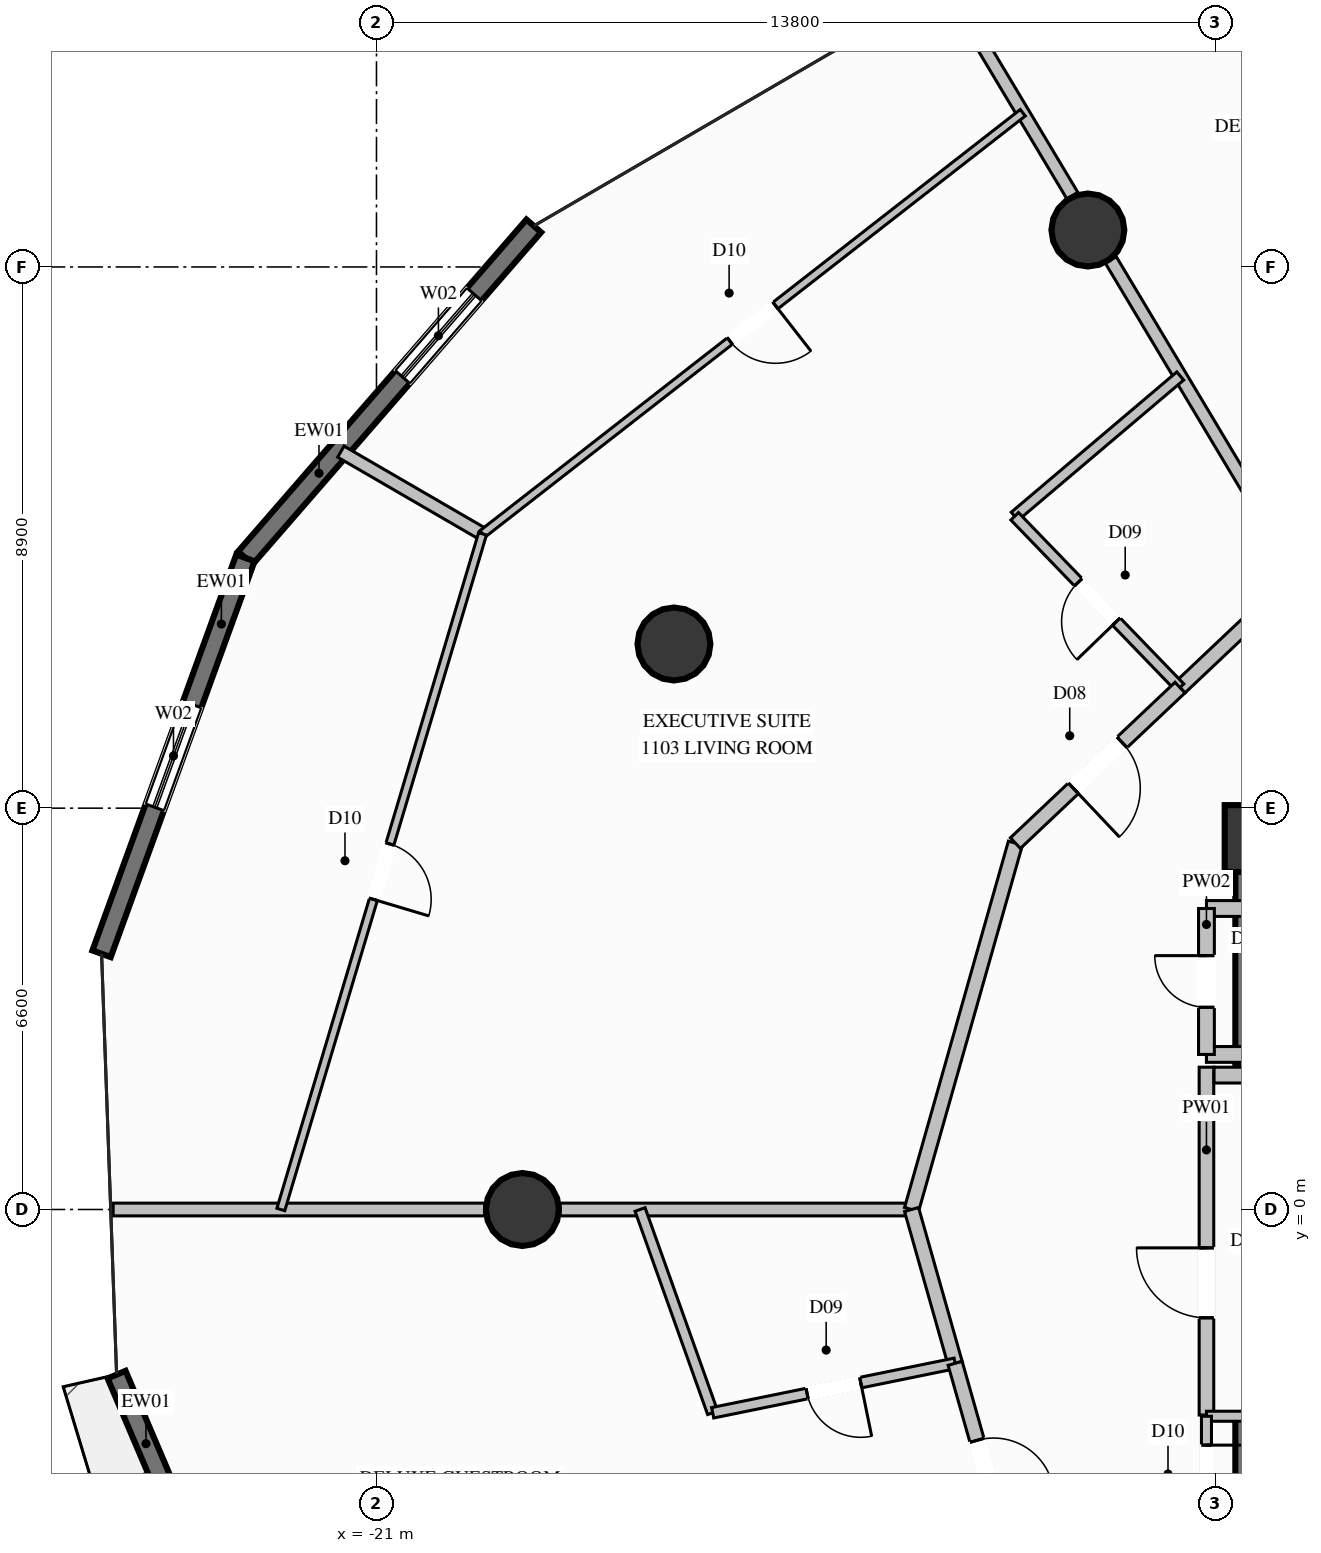
"""IFC4 building model, lengths in metres.
Left out: names, types, materials, properties, quantities, classifications, styles, units other than length and angle.
Written with IfcOpenShell. Run it as: python <this file> out.ifc"""

import sys

from ifc_helpers import new_model, si_unit, direction, frame, frame_2d, origin, origin_2d, place, context, subcontext, project, spatial, rectangle, circle, extrude, element, fill, save


model = new_model("IFC4")
c1 = context("Model", 3, precision=1e-05, world=origin(), true_north=direction((0.0, 1.0)))
c2 = subcontext(c1, "Body", "Model", "MODEL_VIEW")
j1 = project(units=[si_unit("LENGTHUNIT", "METRE"), si_unit("PLANEANGLEUNIT", "RADIAN")], contexts=[c1])
p1 = place(None, origin())
s1 = spatial("IfcSite", under=j1, at=p1, CompositionType="ELEMENT")
p2 = place(p1, origin())
s2 = spatial("IfcBuilding", under=s1, at=p2, CompositionType="ELEMENT")
p3 = place(p2, frame((0.0, 0.0, 42.8)))
s3 = spatial("IfcBuildingStorey", under=s2, at=p3, CompositionType="ELEMENT", Elevation=42.8)
p4 = place(p3, frame((-6.5, 6.1, 0.0), z_axis=(0.0, 0.0, 1.0), x_axis=(1.0, 0.0, 0.0)))
e1 = element("IfcColumn", 1, at=p4, inside=s3, PredefinedType="COLUMN", context=c2, shape_type="SweptSolid", body=[
    extrude(rectangle(XDim=1.1, YDim=1.1, at=origin_2d()), origin(), (0.0, 0.0, 1.0), 3.6),
])
p5 = place(p3, frame((-6.5, 2.35, 0.0), z_axis=(0.0, 0.0, 1.0), x_axis=(0.0, 1.0, 0.0)))
e2 = element("IfcWall", 2, at=p5, inside=s3, PredefinedType="SHEAR", context=c2, shape_type="SweptSolid", body=[
    extrude(rectangle(XDim=4.125, YDim=0.75, at=frame_2d((2.062, 0.0))), origin(), (0.0, 0.0, 1.0), 3.6),
])
p6 = place(p3, frame((-6.5, -6.475, 0.0), z_axis=(0.0, 0.0, 1.0), x_axis=(0.0, 1.0, 0.0)))
e3 = element("IfcWall", 3, at=p6, inside=s3, PredefinedType="SHEAR", context=c2, shape_type="SweptSolid", body=[
    extrude(rectangle(XDim=3.125, YDim=0.75, at=frame_2d((1.562, 0.0))), origin(), (0.0, 0.0, 1.0), 3.6),
])
for number, where, z_axis, x_axis in (
    (4, (-9.3, 16.108, 0.0), (0.0, 0.0, 1.0), (1.0, 0.0, 0.0)),
    (5, (-16.108, 9.3, 0.0), (0.0, 0.0, 1.0), (1.0, 0.0, 0.0)),
    (6, (-18.6, 0.0, 0.0), (0.0, 0.0, 1.0), (1.0, 0.0, 0.0)),
):
    element("IfcColumn", number, at=place(p3, frame(where, z_axis=z_axis, x_axis=x_axis)), inside=s3, PredefinedType="COLUMN", context=c2, shape_type="SweptSolid", body=[
        extrude(circle(Radius=0.6, at=origin_2d()), origin(), (0.0, 0.0, 1.0), 3.6),
    ])
p7 = place(p3, frame((-23.156, 10.715, 0.0), z_axis=(0.0, 0.0, 1.0), x_axis=(0.655795022555, 0.75493899647, 0.0)))
e7 = element("IfcWall", 7, at=p7, inside=s3, PredefinedType="SOLIDWALL", context=c2, shape_type="SweptSolid", body=[
    extrude(rectangle(XDim=7.232, YDim=0.32, at=frame_2d((3.616, 0.0))), origin(), (0.0, 0.0, 1.0), 3.34),
])
p8 = place(p7, frame((3.941, 0.0, 0.35)))
e8 = element("IfcOpeningElement", 8, at=p8, cuts=e7, PredefinedType="OPENING", context=c2, shape_type="SweptSolid", body=[
    extrude(rectangle(XDim=1.8, YDim=2.6, at=frame_2d((0.9, 1.3))), frame((0.0, 0.17, 0.0), z_axis=(0.0, -1.0, 0.0), x_axis=(1.0, 0.0, 0.0)), (0.0, 0.0, 1.0), 0.34),
])
p9 = place(p3, frame((-25.521, 4.205, 0.0), z_axis=(0.0, 0.0, 1.0), x_axis=(0.341451539559, 0.939899380856, 0.0)))
e9 = element("IfcWall", 9, at=p9, inside=s3, PredefinedType="SOLIDWALL", context=c2, shape_type="SweptSolid", body=[
    extrude(rectangle(XDim=6.926, YDim=0.32, at=frame_2d((3.463, 0.0))), origin(), (0.0, 0.0, 1.0), 3.34),
])
p10 = place(p9, frame((2.563, 0.0, 0.35)))
e10 = element("IfcOpeningElement", 10, at=p10, cuts=e9, PredefinedType="OPENING", context=c2, shape_type="SweptSolid", body=[
    extrude(rectangle(XDim=1.8, YDim=2.6, at=frame_2d((0.9, 1.3))), frame((0.0, 0.17, 0.0), z_axis=(0.0, -1.0, 0.0), x_axis=(1.0, 0.0, 0.0)), (0.0, 0.0, 1.0), 0.34),
])
p11 = place(p3, frame((-22.441, -9.371, 0.0), z_axis=(0.0, 0.0, 1.0), x_axis=(-0.391681637704, 0.920100806806, 0.0)))
e11 = element("IfcWall", 11, at=p11, inside=s3, PredefinedType="SOLIDWALL", context=c2, shape_type="SweptSolid", body=[
    extrude(rectangle(XDim=7.233, YDim=0.32, at=frame_2d((3.616, 0.0))), origin(), (0.0, 0.0, 1.0), 3.34),
])
p12 = place(p11, frame((2.716, 0.0, 0.35)))
e12 = element("IfcOpeningElement", 12, at=p12, cuts=e11, PredefinedType="OPENING", context=c2, shape_type="SweptSolid", body=[
    extrude(rectangle(XDim=1.8, YDim=2.6, at=frame_2d((0.9, 1.3))), frame((0.0, 0.17, 0.0), z_axis=(0.0, -1.0, 0.0), x_axis=(1.0, 0.0, 0.0)), (0.0, 0.0, 1.0), 0.34),
])
p13 = place(p3, frame((-7.35, -3.38, 0.0), z_axis=(0.0, 0.0, 1.0), x_axis=(0.0, 1.0, 0.0)))
e13 = element("IfcWall", 13, at=p13, inside=s3, PredefinedType="PARTITIONING", context=c2, shape_type="SweptSolid", body=[
    extrude(rectangle(XDim=5.72, YDim=0.24, at=frame_2d((2.86, 0.0))), origin(), (0.0, 0.0, 1.0), 2.425),
])
p14 = place(p13, frame((1.599, 0.0, 0.0)))
e14 = element("IfcOpeningElement", 14, at=p14, cuts=e13, PredefinedType="OPENING", context=c2, shape_type="SweptSolid", body=[
    extrude(rectangle(XDim=1.15, YDim=2.2, at=frame_2d((0.575, 1.1))), frame((0.0, 0.13, 0.0), z_axis=(0.0, -1.0, 0.0), x_axis=(1.0, 0.0, 0.0)), (0.0, 0.0, 1.0), 0.26),
])
p15 = place(p3, frame((-7.225, 2.21, 0.0), z_axis=(0.0, 0.0, 1.0), x_axis=(1.0, 0.0, 0.0)))
e15 = element("IfcWall", 15, at=p15, inside=s3, PredefinedType="PARTITIONING", context=c2, shape_type="SweptSolid", body=[
    extrude(rectangle(XDim=0.875, YDim=0.26, at=frame_2d((0.438, 0.0))), origin(), (0.0, 0.0, 1.0), 3.34),
])
for number, where, z_axis, x_axis in (
    (16, (-7.35, 4.95, 0.0), (0.0, 0.0, 1.0), (1.0, 0.0, 0.0)),
    (17, (-7.35, 2.55, 0.0), (0.0, 0.0, 1.0), (1.0, 0.0, 0.0)),
):
    element("IfcWall", number, at=place(p3, frame(where, z_axis=z_axis, x_axis=x_axis)), inside=s3, PredefinedType="PARTITIONING", context=c2, shape_type="SweptSolid", body=[
        extrude(rectangle(XDim=0.93, YDim=0.26, at=frame_2d((0.465, 0.0))), origin(), (0.0, 0.0, 1.0), 3.34),
    ])
p16 = place(p3, frame((-7.35, 2.55, 0.0), z_axis=(0.0, 0.0, 1.0), x_axis=(0.0, 1.0, 0.0)))
e18 = element("IfcWall", 18, at=p16, inside=s3, PredefinedType="PARTITIONING", context=c2, shape_type="SweptSolid", body=[
    extrude(rectangle(XDim=2.4, YDim=0.26, at=frame_2d((1.2, 0.0))), origin(), (0.0, 0.0, 1.0), 2.425),
])
p17 = place(p16, frame((0.775, 0.0, 0.0)))
e19 = element("IfcOpeningElement", 19, at=p17, cuts=e18, PredefinedType="OPENING", context=c2, shape_type="SweptSolid", body=[
    extrude(rectangle(XDim=0.85, YDim=2.05, at=frame_2d((0.425, 1.025))), frame((0.0, 0.14, 0.0), z_axis=(0.0, -1.0, 0.0), x_axis=(1.0, 0.0, 0.0)), (0.0, 0.0, 1.0), 0.28),
])
p18 = place(p3, frame((-5.85, -3.4, 0.0), z_axis=(0.0, 0.0, 1.0), x_axis=(-1.0, 0.0, 0.0)))
e20 = element("IfcWall", 20, at=p18, inside=s3, PredefinedType="PARTITIONING", context=c2, shape_type="SweptSolid", body=[
    extrude(rectangle(XDim=1.5, YDim=0.165, at=frame_2d((0.75, 0.0))), origin(), (0.0, 0.0, 1.0), 3.34),
])
p19 = place(p3, frame((-7.35, -3.4, 0.0), z_axis=(0.0, 0.0, 1.0), x_axis=(0.0, -1.0, 0.0)))
e21 = element("IfcWall", 21, at=p19, inside=s3, PredefinedType="PARTITIONING", context=c2, shape_type="SweptSolid", body=[
    extrude(rectangle(XDim=1.9, YDim=0.165, at=frame_2d((0.95, 0.0))), origin(), (0.0, 0.0, 1.0), 3.34),
])
p20 = place(p19, frame((0.475, 0.0, 0.0)))
e22 = element("IfcOpeningElement", 22, at=p20, cuts=e21, PredefinedType="OPENING", context=c2, shape_type="SweptSolid", body=[
    extrude(rectangle(XDim=0.95, YDim=2.1, at=frame_2d((0.475, 1.05))), frame((0.0, 0.093, 0.0), z_axis=(0.0, -1.0, 0.0), x_axis=(1.0, 0.0, 0.0)), (0.0, 0.0, 1.0), 0.185),
])
p21 = place(p3, frame((-5.825, 10.436, 0.0), z_axis=(0.0, 0.0, 1.0), x_axis=(-0.513299626213, 0.858209469611, 0.0)))
e23 = element("IfcWall", 23, at=p21, inside=s3, PredefinedType="PARTITIONING", context=c2, shape_type="SweptSolid", body=[
    extrude(rectangle(XDim=6.036, YDim=0.21, at=frame_2d((3.018, 0.0))), origin(), (0.0, 0.0, 1.0), 2.708),
])
p22 = place(p3, frame((-9.555, 16.673, 0.0), z_axis=(0.0, 0.0, 1.0), x_axis=(-0.513466244752, 0.858109792218, 0.0)))
e24 = element("IfcWall", 24, at=p22, inside=s3, PredefinedType="PARTITIONING", context=c2, shape_type="SweptSolid", body=[
    extrude(rectangle(XDim=3.942, YDim=0.21, at=frame_2d((1.971, 0.0))), origin(), (0.0, 0.0, 1.0), 3.34),
])
p23 = place(p3, frame((-12.2, 0.0, 0.0), z_axis=(0.0, 0.0, 1.0), x_axis=(-1.0, 0.0, 0.0)))
e25 = element("IfcWall", 25, at=p23, inside=s3, PredefinedType="PARTITIONING", context=c2, shape_type="SweptSolid", body=[
    extrude(rectangle(XDim=5.78, YDim=0.21, at=frame_2d((2.89, 0.0))), origin(), (0.0, 0.0, 1.0), 2.708),
])
p24 = place(p3, frame((-19.22, 0.0, 0.0), z_axis=(0.0, 0.0, 1.0), x_axis=(-1.0, 0.0, 0.0)))
e26 = element("IfcWall", 26, at=p24, inside=s3, PredefinedType="PARTITIONING", context=c2, shape_type="SweptSolid", body=[
    extrude(rectangle(XDim=6.111, YDim=0.21, at=frame_2d((3.056, 0.0))), origin(), (0.0, 0.0, 1.0), 3.34),
])
p25 = place(p3, frame((-5.825, 10.436, 0.0), z_axis=(0.0, 0.0, 1.0), x_axis=(-0.726651583854, -0.687006168591, 0.0)))
e27 = element("IfcWall", 27, at=p25, inside=s3, PredefinedType="PARTITIONING", context=c2, shape_type="SweptSolid", body=[
    extrude(rectangle(XDim=2.697, YDim=0.24, at=frame_2d((1.349, 0.0))), origin(), (0.0, 0.0, 1.0), 3.34),
])
p26 = place(p3, frame((-7.781, 13.707, 0.0), z_axis=(0.0, 0.0, 1.0), x_axis=(-0.762952785228, -0.646454211459, 0.0)))
e28 = element("IfcWall", 28, at=p26, inside=s3, PredefinedType="PLUMBINGWALL", context=c2, shape_type="SweptSolid", body=[
    extrude(rectangle(XDim=3.569, YDim=0.175, at=frame_2d((1.784, 0.0))), origin(), (0.0, 0.0, 1.0), 3.34),
])
p27 = place(p3, frame((-7.785, 8.583, 0.0), z_axis=(0.0, 0.0, 1.0), x_axis=(-0.694493235648, 0.71949923255, 0.0)))
e29 = element("IfcWall", 29, at=p27, inside=s3, PredefinedType="PLUMBINGWALL", context=c2, shape_type="SweptSolid", body=[
    extrude(rectangle(XDim=3.915, YDim=0.175, at=frame_2d((1.958, 0.0))), origin(), (0.0, 0.0, 1.0), 2.708),
])
p28 = place(p27, frame((1.508, 0.0, 0.0)))
e30 = element("IfcOpeningElement", 30, at=p28, cuts=e29, PredefinedType="OPENING", context=c2, shape_type="SweptSolid", body=[
    extrude(rectangle(XDim=0.9, YDim=2.1, at=frame_2d((0.45, 1.05))), frame((0.0, 0.098, 0.0), z_axis=(0.0, -1.0, 0.0), x_axis=(1.0, 0.0, 0.0)), (0.0, 0.0, 1.0), 0.195),
])
p29 = place(p3, frame((-19.256, 11.111, 0.0), z_axis=(0.0, 0.0, 1.0), x_axis=(-0.864950144423, 0.501857796256, 0.0)))
e31 = element("IfcWall", 31, at=p29, inside=s3, PredefinedType="PARTITIONING", context=c2, shape_type="SweptSolid", body=[
    extrude(rectangle(XDim=2.694, YDim=0.21, at=frame_2d((1.347, 0.0))), origin(), (0.0, 0.0, 1.0), 3.34),
])
p30 = place(p3, frame((-10.492, 6.025, 0.0), z_axis=(0.0, 0.0, 1.0), x_axis=(-0.272743314702, -0.962086838225, 0.0)))
e32 = element("IfcWall", 32, at=p30, inside=s3, PredefinedType="PARTITIONING", context=c2, shape_type="SweptSolid", body=[
    extrude(rectangle(XDim=6.262, YDim=0.24, at=frame_2d((3.131, 0.0))), origin(), (0.0, 0.0, 1.0), 3.34),
])
p31 = place(p3, frame((-7.785, 8.583, 0.0), z_axis=(0.0, 0.0, 1.0), x_axis=(-0.726816794063, -0.686831382413, 0.0)))
e33 = element("IfcWall", 33, at=p31, inside=s3, PredefinedType="PARTITIONING", context=c2, shape_type="SweptSolid", body=[
    extrude(rectangle(XDim=3.725, YDim=0.24, at=frame_2d((1.862, 0.0))), origin(), (0.0, 0.0, 1.0), 3.34),
])
p32 = place(p31, frame((1.312, 0.0, 0.0)))
e34 = element("IfcOpeningElement", 34, at=p32, cuts=e33, PredefinedType="OPENING", context=c2, shape_type="SweptSolid", body=[
    extrude(rectangle(XDim=1.1, YDim=2.3, at=frame_2d((0.55, 1.15))), frame((0.0, 0.13, 0.0), z_axis=(0.0, -1.0, 0.0), x_axis=(1.0, 0.0, 0.0)), (0.0, 0.0, 1.0), 0.26),
])
p33 = place(p3, frame((-10.371, 18.036, 0.0), z_axis=(0.0, 0.0, 1.0), x_axis=(-0.788739150212, -0.614728031671, 0.0)))
e35 = element("IfcWall", 35, at=p33, inside=s3, PredefinedType="PARTITIONING", context=c2, shape_type="SweptSolid", body=[
    extrude(rectangle(XDim=11.265, YDim=0.135, at=frame_2d((5.632, 0.0))), origin(), (0.0, 0.0, 1.0), 3.34),
])
p34 = place(p33, frame((5.157, 0.0, 0.0)))
e36 = element("IfcOpeningElement", 36, at=p34, cuts=e35, PredefinedType="OPENING", context=c2, shape_type="SweptSolid", body=[
    extrude(rectangle(XDim=0.95, YDim=2.1, at=frame_2d((0.475, 1.05))), frame((0.0, 0.078, 0.0), z_axis=(0.0, -1.0, 0.0), x_axis=(1.0, 0.0, 0.0)), (0.0, 0.0, 1.0), 0.155),
])
p35 = place(p3, frame((-19.256, 11.111, 0.0), z_axis=(0.0, 0.0, 1.0), x_axis=(-0.28604764492, -0.958215395846, 0.0)))
e37 = element("IfcWall", 37, at=p35, inside=s3, PredefinedType="PARTITIONING", context=c2, shape_type="SweptSolid", body=[
    extrude(rectangle(XDim=11.596, YDim=0.135, at=frame_2d((5.798, 0.0))), origin(), (0.0, 0.0, 1.0), 3.34),
])
p36 = place(p35, frame((5.323, 0.0, 0.0)))
e38 = element("IfcOpeningElement", 38, at=p36, cuts=e37, PredefinedType="OPENING", context=c2, shape_type="SweptSolid", body=[
    extrude(rectangle(XDim=0.95, YDim=2.1, at=frame_2d((0.475, 1.05))), frame((0.0, 0.078, 0.0), z_axis=(0.0, -1.0, 0.0), x_axis=(1.0, 0.0, 0.0)), (0.0, 0.0, 1.0), 0.155),
])
p37 = place(p3, frame((-12.2, 0.0, 0.0), z_axis=(0.0, 0.0, 1.0), x_axis=(0.272672757197, -0.962106837873, 0.0)))
e39 = element("IfcWall", 39, at=p37, inside=s3, PredefinedType="PARTITIONING", context=c2, shape_type="SweptSolid", body=[
    extrude(rectangle(XDim=2.63, YDim=0.24, at=frame_2d((1.315, 0.0))), origin(), (0.0, 0.0, 1.0), 3.34),
])
p38 = place(p3, frame((-16.665, 0.0, 0.0), z_axis=(0.0, 0.0, 1.0), x_axis=(0.336375607453, -0.941727906941, 0.0)))
e40 = element("IfcWall", 40, at=p38, inside=s3, PredefinedType="PLUMBINGWALL", context=c2, shape_type="SweptSolid", body=[
    extrude(rectangle(XDim=3.55, YDim=0.175, at=frame_2d((1.775, 0.0))), origin(), (0.0, 0.0, 1.0), 3.34),
])
p39 = place(p3, frame((-11.483, -2.53, 0.0), z_axis=(0.0, 0.0, 1.0), x_axis=(-0.979847207533, -0.19974846655, 0.0)))
e41 = element("IfcWall", 41, at=p39, inside=s3, PredefinedType="PLUMBINGWALL", context=c2, shape_type="SweptSolid", body=[
    extrude(rectangle(XDim=4.07, YDim=0.175, at=frame_2d((2.035, 0.0))), origin(), (0.0, 0.0, 1.0), 3.34),
])
p40 = place(p39, frame((1.585, 0.0, 0.0)))
e42 = element("IfcOpeningElement", 42, at=p40, cuts=e41, PredefinedType="OPENING", context=c2, shape_type="SweptSolid", body=[
    extrude(rectangle(XDim=0.9, YDim=2.1, at=frame_2d((0.45, 1.05))), frame((0.0, 0.098, 0.0), z_axis=(0.0, -1.0, 0.0), x_axis=(1.0, 0.0, 0.0)), (0.0, 0.0, 1.0), 0.195),
])
p41 = place(p3, frame((-11.483, -2.53, 0.0), z_axis=(0.0, 0.0, 1.0), x_axis=(0.272794390365, -0.96207235725, 0.0)))
e43 = element("IfcWall", 43, at=p41, inside=s3, PredefinedType="PARTITIONING", context=c2, shape_type="SweptSolid", body=[
    extrude(rectangle(XDim=3.633, YDim=0.24, at=frame_2d((1.816, 0.0))), origin(), (0.0, 0.0, 1.0), 3.34),
])
p42 = place(p41, frame((1.316, 0.0, 0.0)))
e44 = element("IfcOpeningElement", 44, at=p42, cuts=e43, PredefinedType="OPENING", context=c2, shape_type="SweptSolid", body=[
    extrude(rectangle(XDim=1.0, YDim=2.2, at=frame_2d((0.5, 1.1))), frame((0.0, 0.13, 0.0), z_axis=(0.0, -1.0, 0.0), x_axis=(1.0, 0.0, 0.0)), (0.0, 0.0, 1.0), 0.26),
])
p43 = place(p8, origin())
e45 = element("IfcWindow", 45, at=p43, inside=s3, PartitioningType="SINGLE_PANEL", PredefinedType="WINDOW", context=c2, shape_type="SweptSolid", body=[
    extrude(rectangle(XDim=1.8, YDim=2.6, at=frame_2d((0.9, 1.3))), frame((0.0, 0.03, 0.0), z_axis=(0.0, -1.0, 0.0), x_axis=(1.0, 0.0, 0.0)), (0.0, 0.0, 1.0), 0.06),
])
fill(e8, e45)
p44 = place(p10, origin())
e46 = element("IfcWindow", 46, at=p44, inside=s3, PartitioningType="SINGLE_PANEL", PredefinedType="WINDOW", context=c2, shape_type="SweptSolid", body=[
    extrude(rectangle(XDim=1.8, YDim=2.6, at=frame_2d((0.9, 1.3))), frame((0.0, 0.03, 0.0), z_axis=(0.0, -1.0, 0.0), x_axis=(1.0, 0.0, 0.0)), (0.0, 0.0, 1.0), 0.06),
])
fill(e10, e46)
p45 = place(p14, origin())
e47 = element("IfcDoor", 47, at=p45, inside=s3, OperationType="SINGLE_SWING_RIGHT", PredefinedType="DOOR", context=c2, shape_type="SweptSolid", body=[
    extrude(rectangle(XDim=1.15, YDim=2.2, at=frame_2d((0.575, 1.1))), frame((0.0, 0.025, 0.0), z_axis=(0.0, -1.0, 0.0), x_axis=(1.0, 0.0, 0.0)), (0.0, 0.0, 1.0), 0.05),
])
fill(e14, e47)
p46 = place(p17, origin())
e48 = element("IfcDoor", 48, at=p46, inside=s3, OperationType="SINGLE_SWING_RIGHT", PredefinedType="DOOR", context=c2, shape_type="SweptSolid", body=[
    extrude(rectangle(XDim=0.85, YDim=2.05, at=frame_2d((0.425, 1.025))), frame((0.0, 0.025, 0.0), z_axis=(0.0, -1.0, 0.0), x_axis=(1.0, 0.0, 0.0)), (0.0, 0.0, 1.0), 0.05),
])
fill(e19, e48)
p47 = place(p20, origin())
e49 = element("IfcDoor", 49, at=p47, inside=s3, OperationType="SINGLE_SWING_LEFT", PredefinedType="DOOR", context=c2, shape_type="SweptSolid", body=[
    extrude(rectangle(XDim=0.95, YDim=2.1, at=frame_2d((0.475, 1.05))), frame((0.0, 0.025, 0.0), z_axis=(0.0, -1.0, 0.0), x_axis=(1.0, 0.0, 0.0)), (0.0, 0.0, 1.0), 0.05),
])
fill(e22, e49)
p48 = place(p28, origin())
e50 = element("IfcDoor", 50, at=p48, inside=s3, OperationType="SINGLE_SWING_LEFT", PredefinedType="DOOR", context=c2, shape_type="SweptSolid", body=[
    extrude(rectangle(XDim=0.9, YDim=2.1, at=frame_2d((0.45, 1.05))), frame((0.0, 0.025, 0.0), z_axis=(0.0, -1.0, 0.0), x_axis=(1.0, 0.0, 0.0)), (0.0, 0.0, 1.0), 0.05),
])
fill(e30, e50)
p49 = place(p32, origin())
e51 = element("IfcDoor", 51, at=p49, inside=s3, OperationType="SINGLE_SWING_RIGHT", PredefinedType="DOOR", context=c2, shape_type="SweptSolid", body=[
    extrude(rectangle(XDim=1.1, YDim=2.3, at=frame_2d((0.55, 1.15))), frame((0.0, 0.025, 0.0), z_axis=(0.0, -1.0, 0.0), x_axis=(1.0, 0.0, 0.0)), (0.0, 0.0, 1.0), 0.05),
])
fill(e34, e51)
p50 = place(p34, origin())
e52 = element("IfcDoor", 52, at=p50, inside=s3, OperationType="SINGLE_SWING_LEFT", PredefinedType="DOOR", context=c2, shape_type="SweptSolid", body=[
    extrude(rectangle(XDim=0.95, YDim=2.1, at=frame_2d((0.475, 1.05))), frame((0.0, 0.025, 0.0), z_axis=(0.0, -1.0, 0.0), x_axis=(1.0, 0.0, 0.0)), (0.0, 0.0, 1.0), 0.05),
])
fill(e36, e52)
p51 = place(p36, origin())
e53 = element("IfcDoor", 53, at=p51, inside=s3, OperationType="SINGLE_SWING_RIGHT", PredefinedType="DOOR", context=c2, shape_type="SweptSolid", body=[
    extrude(rectangle(XDim=0.95, YDim=2.1, at=frame_2d((0.475, 1.05))), frame((0.0, 0.025, 0.0), z_axis=(0.0, -1.0, 0.0), x_axis=(1.0, 0.0, 0.0)), (0.0, 0.0, 1.0), 0.05),
])
fill(e38, e53)
p52 = place(p40, origin())
e54 = element("IfcDoor", 54, at=p52, inside=s3, OperationType="SINGLE_SWING_LEFT", PredefinedType="DOOR", context=c2, shape_type="SweptSolid", body=[
    extrude(rectangle(XDim=0.9, YDim=2.1, at=frame_2d((0.45, 1.05))), frame((0.0, 0.025, 0.0), z_axis=(0.0, -1.0, 0.0), x_axis=(1.0, 0.0, 0.0)), (0.0, 0.0, 1.0), 0.05),
])
fill(e42, e54)
p53 = place(p42, origin())
e55 = element("IfcDoor", 55, at=p53, inside=s3, OperationType="SINGLE_SWING_RIGHT", PredefinedType="DOOR", context=c2, shape_type="SweptSolid", body=[
    extrude(rectangle(XDim=1.0, YDim=2.2, at=frame_2d((0.5, 1.1))), frame((0.0, 0.025, 0.0), z_axis=(0.0, -1.0, 0.0), x_axis=(1.0, 0.0, 0.0)), (0.0, 0.0, 1.0), 0.05),
])
fill(e44, e55)
save(model, sys.argv[1])
